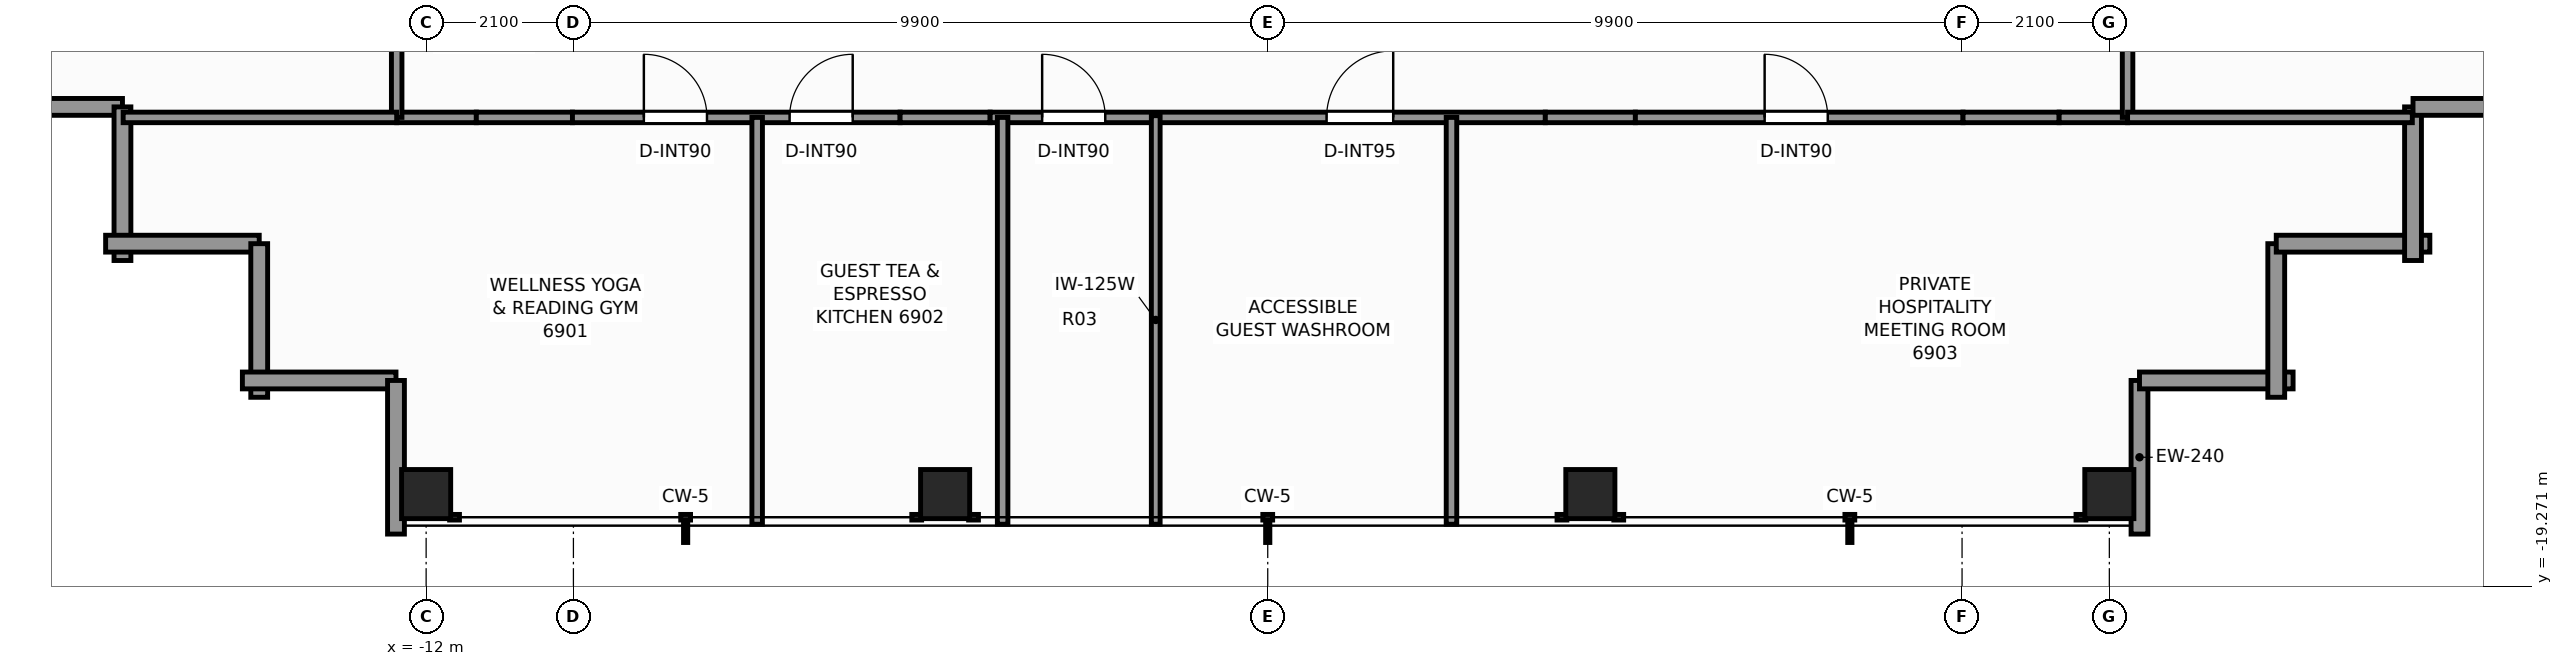
"""IFC4 building model, lengths in metres.
Left out: names, types, materials, properties, quantities, classifications, styles, units other than length and angle.
Written with IfcOpenShell. Run it as: python <this file> out.ifc"""

import sys

from ifc_helpers import new_model, si_unit, direction, frame, frame_2d, origin, origin_2d, place, context, subcontext, project, spatial, rectangle, extrude, element, fill, save


model = new_model("IFC4")
c1 = context("Model", 3, precision=1e-05, world=origin(), true_north=direction((0.0, 1.0)))
c2 = subcontext(c1, "Body", "Model", "MODEL_VIEW")
j1 = project(units=[si_unit("LENGTHUNIT", "METRE"), si_unit("PLANEANGLEUNIT", "RADIAN")], contexts=[c1])
p1 = place(None, origin())
s1 = spatial("IfcSite", under=j1, at=p1, CompositionType="ELEMENT")
p2 = place(p1, origin())
s2 = spatial("IfcBuilding", under=s1, at=p2, CompositionType="ELEMENT")
p3 = place(p2, frame((0.0, 0.0, 237.4)))
s3 = spatial("IfcBuildingStorey", under=s2, at=p3, CompositionType="ELEMENT", Elevation=237.4)
for number, where, z_axis, x_axis in (
    (1, (-12.0, -17.95, 0.0), (0.0, 0.0, 1.0), (1.0, 0.0, 0.0)),
    (2, (-4.6, -17.95, 0.0), (0.0, 0.0, 1.0), (1.0, 0.0, 0.0)),
    (3, (4.6, -17.95, 0.0), (0.0, 0.0, 1.0), (1.0, 0.0, 0.0)),
    (4, (12.0, -17.95, 0.0), (0.0, 0.0, 1.0), (1.0, 0.0, 0.0)),
):
    element("IfcColumn", number, at=place(p3, frame(where, z_axis=z_axis, x_axis=x_axis)), inside=s3, PredefinedType="COLUMN", context=c2, shape_type="SweptSolid", body=[
        extrude(rectangle(XDim=0.7, YDim=0.7, at=origin_2d()), origin(), (0.0, 0.0, 1.0), 3.5),
    ])
p4 = place(p3, frame((12.43, -16.33, 0.0), z_axis=(0.0, 0.0, 1.0), x_axis=(0.0, -1.0, 0.0)))
e5 = element("IfcWall", 5, at=p4, inside=s3, PredefinedType="STANDARD", context=c2, shape_type="SweptSolid", body=[
    extrude(rectangle(XDim=2.19, YDim=0.24, at=frame_2d((1.095, 0.0))), origin(), (0.0, 0.0, 1.0), 1.445),
])
for number, where, z_axis, x_axis in (
    (6, (14.62, -16.33, 0.0), (0.0, 0.0, 1.0), (-1.0, 0.0, 0.0)),
    (7, (14.38, -14.38, 0.0), (0.0, 0.0, 1.0), (0.0, -1.0, 0.0)),
    (8, (16.57, -14.38, 0.0), (0.0, 0.0, 1.0), (-1.0, 0.0, 0.0)),
    (9, (16.33, -12.43, 0.0), (0.0, 0.0, 1.0), (0.0, -1.0, 0.0)),
):
    element("IfcWall", number, at=place(p3, frame(where, z_axis=z_axis, x_axis=x_axis)), inside=s3, PredefinedType="STANDARD", context=c2, shape_type="SweptSolid", body=[
        extrude(rectangle(XDim=2.19, YDim=0.24, at=frame_2d((1.095, 0.0))), origin(), (0.0, 0.0, 1.0), 2.633),
    ])
for number, where, z_axis, x_axis in (
    (10, (18.52, -12.43, 0.0), (0.0, 0.0, 1.0), (-1.0, 0.0, 0.0)),
    (11, (-16.33, -12.43, 0.0), (0.0, 0.0, 1.0), (-1.0, 0.0, 0.0)),
):
    element("IfcWall", number, at=place(p3, frame(where, z_axis=z_axis, x_axis=x_axis)), inside=s3, PredefinedType="STANDARD", context=c2, shape_type="SweptSolid", body=[
        extrude(rectangle(XDim=2.19, YDim=0.24, at=frame_2d((1.095, 0.0))), origin(), (0.0, 0.0, 1.0), 1.445),
    ])
for number, where, z_axis, x_axis in (
    (12, (-16.33, -14.62, 0.0), (0.0, 0.0, 1.0), (0.0, 1.0, 0.0)),
    (13, (-14.38, -14.38, 0.0), (0.0, 0.0, 1.0), (-1.0, 0.0, 0.0)),
    (14, (-14.38, -16.57, 0.0), (0.0, 0.0, 1.0), (0.0, 1.0, 0.0)),
    (15, (-12.43, -16.33, 0.0), (0.0, 0.0, 1.0), (-1.0, 0.0, 0.0)),
):
    element("IfcWall", number, at=place(p3, frame(where, z_axis=z_axis, x_axis=x_axis)), inside=s3, PredefinedType="STANDARD", context=c2, shape_type="SweptSolid", body=[
        extrude(rectangle(XDim=2.19, YDim=0.24, at=frame_2d((1.095, 0.0))), origin(), (0.0, 0.0, 1.0), 2.633),
    ])
p5 = place(p3, frame((-12.43, -18.52, 0.0), z_axis=(0.0, 0.0, 1.0), x_axis=(0.0, 1.0, 0.0)))
e16 = element("IfcWall", 16, at=p5, inside=s3, PredefinedType="STANDARD", context=c2, shape_type="SweptSolid", body=[
    extrude(rectangle(XDim=2.19, YDim=0.24, at=frame_2d((1.095, 0.0))), origin(), (0.0, 0.0, 1.0), 1.445),
])
p6 = place(p3, frame((-12.42, -12.58, 0.0), z_axis=(0.0, 0.0, 1.0), x_axis=(1.0, 0.0, 0.0)))
e17 = element("IfcWall", 17, at=p6, inside=s3, PredefinedType="PARTITIONING", context=c2, shape_type="SweptSolid", body=[
    extrude(rectangle(XDim=1.136, YDim=0.15, at=frame_2d((0.568, 0.0))), origin(), (0.0, 0.0, 1.0), 3.25),
])
p7 = place(p3, frame((-11.284, -12.58, 0.0), z_axis=(0.0, 0.0, 1.0), x_axis=(1.0, 0.0, 0.0)))
e18 = element("IfcWall", 18, at=p7, inside=s3, PredefinedType="PARTITIONING", context=c2, shape_type="SweptSolid", body=[
    extrude(rectangle(XDim=1.37, YDim=0.15, at=frame_2d((0.685, 0.0))), origin(), (0.0, 0.0, 1.0), 1.435),
])
p8 = place(p3, frame((-9.914, -12.58, 0.0), z_axis=(0.0, 0.0, 1.0), x_axis=(1.0, 0.0, 0.0)))
e19 = element("IfcWall", 19, at=p8, inside=s3, PredefinedType="PARTITIONING", context=c2, shape_type="SweptSolid", body=[
    extrude(rectangle(XDim=4.672, YDim=0.15, at=frame_2d((2.336, 0.0))), origin(), (0.0, 0.0, 1.0), 3.25),
])
p9 = place(p8, frame((1.018, 0.0, 0.0)))
e20 = element("IfcOpeningElement", 20, at=p9, cuts=e19, PredefinedType="OPENING", context=c2, shape_type="SweptSolid", body=[
    extrude(rectangle(XDim=0.9, YDim=2.06, at=frame_2d((0.45, 1.03))), frame((0.0, 0.085, 0.0), z_axis=(0.0, -1.0, 0.0), x_axis=(1.0, 0.0, 0.0)), (0.0, 0.0, 1.0), 0.17),
])
p10 = place(p8, frame((3.096, 0.0, 0.0)))
e21 = element("IfcOpeningElement", 21, at=p10, cuts=e19, PredefinedType="OPENING", context=c2, shape_type="SweptSolid", body=[
    extrude(rectangle(XDim=0.9, YDim=2.06, at=frame_2d((0.45, 1.03))), frame((0.0, 0.085, 0.0), z_axis=(0.0, -1.0, 0.0), x_axis=(1.0, 0.0, 0.0)), (0.0, 0.0, 1.0), 0.17),
])
p11 = place(p3, frame((-5.242, -12.58, 0.0), z_axis=(0.0, 0.0, 1.0), x_axis=(1.0, 0.0, 0.0)))
e22 = element("IfcWall", 22, at=p11, inside=s3, PredefinedType="PARTITIONING", context=c2, shape_type="SweptSolid", body=[
    extrude(rectangle(XDim=1.284, YDim=0.15, at=frame_2d((0.642, 0.0))), origin(), (0.0, 0.0, 1.0), 1.435),
])
p12 = place(p3, frame((-3.958, -12.58, 0.0), z_axis=(0.0, 0.0, 1.0), x_axis=(1.0, 0.0, 0.0)))
e23 = element("IfcWall", 23, at=p12, inside=s3, PredefinedType="PARTITIONING", context=c2, shape_type="SweptSolid", body=[
    extrude(rectangle(XDim=7.916, YDim=0.15, at=frame_2d((3.958, 0.0))), origin(), (0.0, 0.0, 1.0), 2.539),
])
p13 = place(p12, frame((0.741, 0.0, 0.0)))
e24 = element("IfcOpeningElement", 24, at=p13, cuts=e23, PredefinedType="OPENING", context=c2, shape_type="SweptSolid", body=[
    extrude(rectangle(XDim=0.9, YDim=2.06, at=frame_2d((0.45, 1.03))), frame((0.0, 0.085, 0.0), z_axis=(0.0, -1.0, 0.0), x_axis=(1.0, 0.0, 0.0)), (0.0, 0.0, 1.0), 0.17),
])
p14 = place(p12, frame((4.797, 0.0, 0.0)))
e25 = element("IfcOpeningElement", 25, at=p14, cuts=e23, PredefinedType="OPENING", context=c2, shape_type="SweptSolid", body=[
    extrude(rectangle(XDim=0.95, YDim=2.06, at=frame_2d((0.475, 1.03))), frame((0.0, 0.085, 0.0), z_axis=(0.0, -1.0, 0.0), x_axis=(1.0, 0.0, 0.0)), (0.0, 0.0, 1.0), 0.17),
])
p15 = place(p3, frame((3.958, -12.58, 0.0), z_axis=(0.0, 0.0, 1.0), x_axis=(1.0, 0.0, 0.0)))
e26 = element("IfcWall", 26, at=p15, inside=s3, PredefinedType="PARTITIONING", context=c2, shape_type="SweptSolid", body=[
    extrude(rectangle(XDim=1.284, YDim=0.15, at=frame_2d((0.642, 0.0))), origin(), (0.0, 0.0, 1.0), 1.435),
])
p16 = place(p3, frame((5.242, -12.58, 0.0), z_axis=(0.0, 0.0, 1.0), x_axis=(1.0, 0.0, 0.0)))
e27 = element("IfcWall", 27, at=p16, inside=s3, PredefinedType="PARTITIONING", context=c2, shape_type="SweptSolid", body=[
    extrude(rectangle(XDim=4.672, YDim=0.15, at=frame_2d((2.336, 0.0))), origin(), (0.0, 0.0, 1.0), 3.25),
])
p17 = place(p16, frame((1.843, 0.0, 0.0)))
e28 = element("IfcOpeningElement", 28, at=p17, cuts=e27, PredefinedType="OPENING", context=c2, shape_type="SweptSolid", body=[
    extrude(rectangle(XDim=0.9, YDim=2.06, at=frame_2d((0.45, 1.03))), frame((0.0, 0.085, 0.0), z_axis=(0.0, -1.0, 0.0), x_axis=(1.0, 0.0, 0.0)), (0.0, 0.0, 1.0), 0.17),
])
p18 = place(p3, frame((9.914, -12.58, 0.0), z_axis=(0.0, 0.0, 1.0), x_axis=(1.0, 0.0, 0.0)))
e29 = element("IfcWall", 29, at=p18, inside=s3, PredefinedType="PARTITIONING", context=c2, shape_type="SweptSolid", body=[
    extrude(rectangle(XDim=1.37, YDim=0.15, at=frame_2d((0.685, 0.0))), origin(), (0.0, 0.0, 1.0), 1.435),
])
p19 = place(p3, frame((11.284, -12.58, 0.0), z_axis=(0.0, 0.0, 1.0), x_axis=(1.0, 0.0, 0.0)))
e30 = element("IfcWall", 30, at=p19, inside=s3, PredefinedType="PARTITIONING", context=c2, shape_type="SweptSolid", body=[
    extrude(rectangle(XDim=0.976, YDim=0.15, at=frame_2d((0.488, 0.0))), origin(), (0.0, 0.0, 1.0), 3.25),
])
p20 = place(p3, frame((-12.42, -12.58, 0.0), z_axis=(0.0, 0.0, 1.0), x_axis=(0.0, 1.0, 0.0)))
e31 = element("IfcWall", 31, at=p20, inside=s3, PredefinedType="PARTITIONING", context=c2, shape_type="SweptSolid", body=[
    extrude(rectangle(XDim=1.337, YDim=0.15, at=frame_2d((0.669, 0.0))), origin(), (0.0, 0.0, 1.0), 3.25),
])
p21 = place(p3, frame((12.26, -12.58, 0.0), z_axis=(0.0, 0.0, 1.0), x_axis=(0.0, 1.0, 0.0)))
e32 = element("IfcWall", 32, at=p21, inside=s3, PredefinedType="PARTITIONING", context=c2, shape_type="SweptSolid", body=[
    extrude(rectangle(XDim=1.379, YDim=0.15, at=frame_2d((0.69, 0.0))), origin(), (0.0, 0.0, 1.0), 3.25),
])
p22 = place(p3, frame((-16.32, -12.58, 0.0), z_axis=(0.0, 0.0, 1.0), x_axis=(1.0, 0.0, 0.0)))
e33 = element("IfcWall", 33, at=p22, inside=s3, PredefinedType="PARTITIONING", context=c2, shape_type="SweptSolid", body=[
    extrude(rectangle(XDim=3.9, YDim=0.15, at=frame_2d((1.95, 0.0))), origin(), (0.0, 0.0, 1.0), 3.25),
])
p23 = place(p3, frame((12.26, -12.58, 0.0), z_axis=(0.0, 0.0, 1.0), x_axis=(1.0, 0.0, 0.0)))
e34 = element("IfcWall", 34, at=p23, inside=s3, PredefinedType="PARTITIONING", context=c2, shape_type="SweptSolid", body=[
    extrude(rectangle(XDim=4.06, YDim=0.15, at=frame_2d((2.03, 0.0))), origin(), (0.0, 0.0, 1.0), 3.25),
])
for number, where, z_axis, x_axis in (
    (35, (-7.28, -18.38, 0.0), (0.0, 0.0, 1.0), (0.0, 1.0, 0.0)),
    (36, (-3.78, -18.38, 0.0), (0.0, 0.0, 1.0), (0.0, 1.0, 0.0)),
    (37, (2.62, -18.38, 0.0), (0.0, 0.0, 1.0), (0.0, 1.0, 0.0)),
):
    element("IfcWall", number, at=place(p3, frame(where, z_axis=z_axis, x_axis=x_axis)), inside=s3, PredefinedType="PARTITIONING", context=c2, shape_type="SweptSolid", body=[
        extrude(rectangle(XDim=5.8, YDim=0.15, at=frame_2d((2.9, 0.0))), origin(), (0.0, 0.0, 1.0), 2.623),
    ])
p24 = place(p3, frame((-1.597, -18.38, 0.0), z_axis=(0.0, 0.0, 1.0), x_axis=(0.0, 1.0, 0.0)))
e38 = element("IfcWall", 38, at=p24, inside=s3, PredefinedType="PARTITIONING", context=c2, shape_type="SweptSolid", body=[
    extrude(rectangle(XDim=5.825, YDim=0.125, at=frame_2d((2.913, 0.0))), origin(), (0.0, 0.0, 1.0), 2.623),
])
p25 = place(p9, origin())
e39 = element("IfcDoor", 39, at=p25, inside=s3, OperationType="SINGLE_SWING_LEFT", PredefinedType="DOOR", context=c2, shape_type="SweptSolid", body=[
    extrude(rectangle(XDim=0.9, YDim=2.06, at=frame_2d((0.45, 1.03))), frame((0.0, 0.025, 0.0), z_axis=(0.0, -1.0, 0.0), x_axis=(1.0, 0.0, 0.0)), (0.0, 0.0, 1.0), 0.05),
])
fill(e20, e39)
p26 = place(p10, origin())
e40 = element("IfcDoor", 40, at=p26, inside=s3, OperationType="SINGLE_SWING_RIGHT", PredefinedType="DOOR", context=c2, shape_type="SweptSolid", body=[
    extrude(rectangle(XDim=0.9, YDim=2.06, at=frame_2d((0.45, 1.03))), frame((0.0, 0.025, 0.0), z_axis=(0.0, -1.0, 0.0), x_axis=(1.0, 0.0, 0.0)), (0.0, 0.0, 1.0), 0.05),
])
fill(e21, e40)
p27 = place(p13, origin())
e41 = element("IfcDoor", 41, at=p27, inside=s3, OperationType="SINGLE_SWING_LEFT", PredefinedType="DOOR", context=c2, shape_type="SweptSolid", body=[
    extrude(rectangle(XDim=0.9, YDim=2.06, at=frame_2d((0.45, 1.03))), frame((0.0, 0.025, 0.0), z_axis=(0.0, -1.0, 0.0), x_axis=(1.0, 0.0, 0.0)), (0.0, 0.0, 1.0), 0.05),
])
fill(e24, e41)
p28 = place(p14, origin())
e42 = element("IfcDoor", 42, at=p28, inside=s3, OperationType="SINGLE_SWING_RIGHT", PredefinedType="DOOR", context=c2, shape_type="SweptSolid", body=[
    extrude(rectangle(XDim=0.95, YDim=2.06, at=frame_2d((0.475, 1.03))), frame((0.0, 0.025, 0.0), z_axis=(0.0, -1.0, 0.0), x_axis=(1.0, 0.0, 0.0)), (0.0, 0.0, 1.0), 0.05),
])
fill(e25, e42)
p29 = place(p17, origin())
e43 = element("IfcDoor", 43, at=p29, inside=s3, OperationType="SINGLE_SWING_LEFT", PredefinedType="DOOR", context=c2, shape_type="SweptSolid", body=[
    extrude(rectangle(XDim=0.9, YDim=2.06, at=frame_2d((0.45, 1.03))), frame((0.0, 0.025, 0.0), z_axis=(0.0, -1.0, 0.0), x_axis=(1.0, 0.0, 0.0)), (0.0, 0.0, 1.0), 0.05),
])
fill(e28, e43)
save(model, sys.argv[1])
